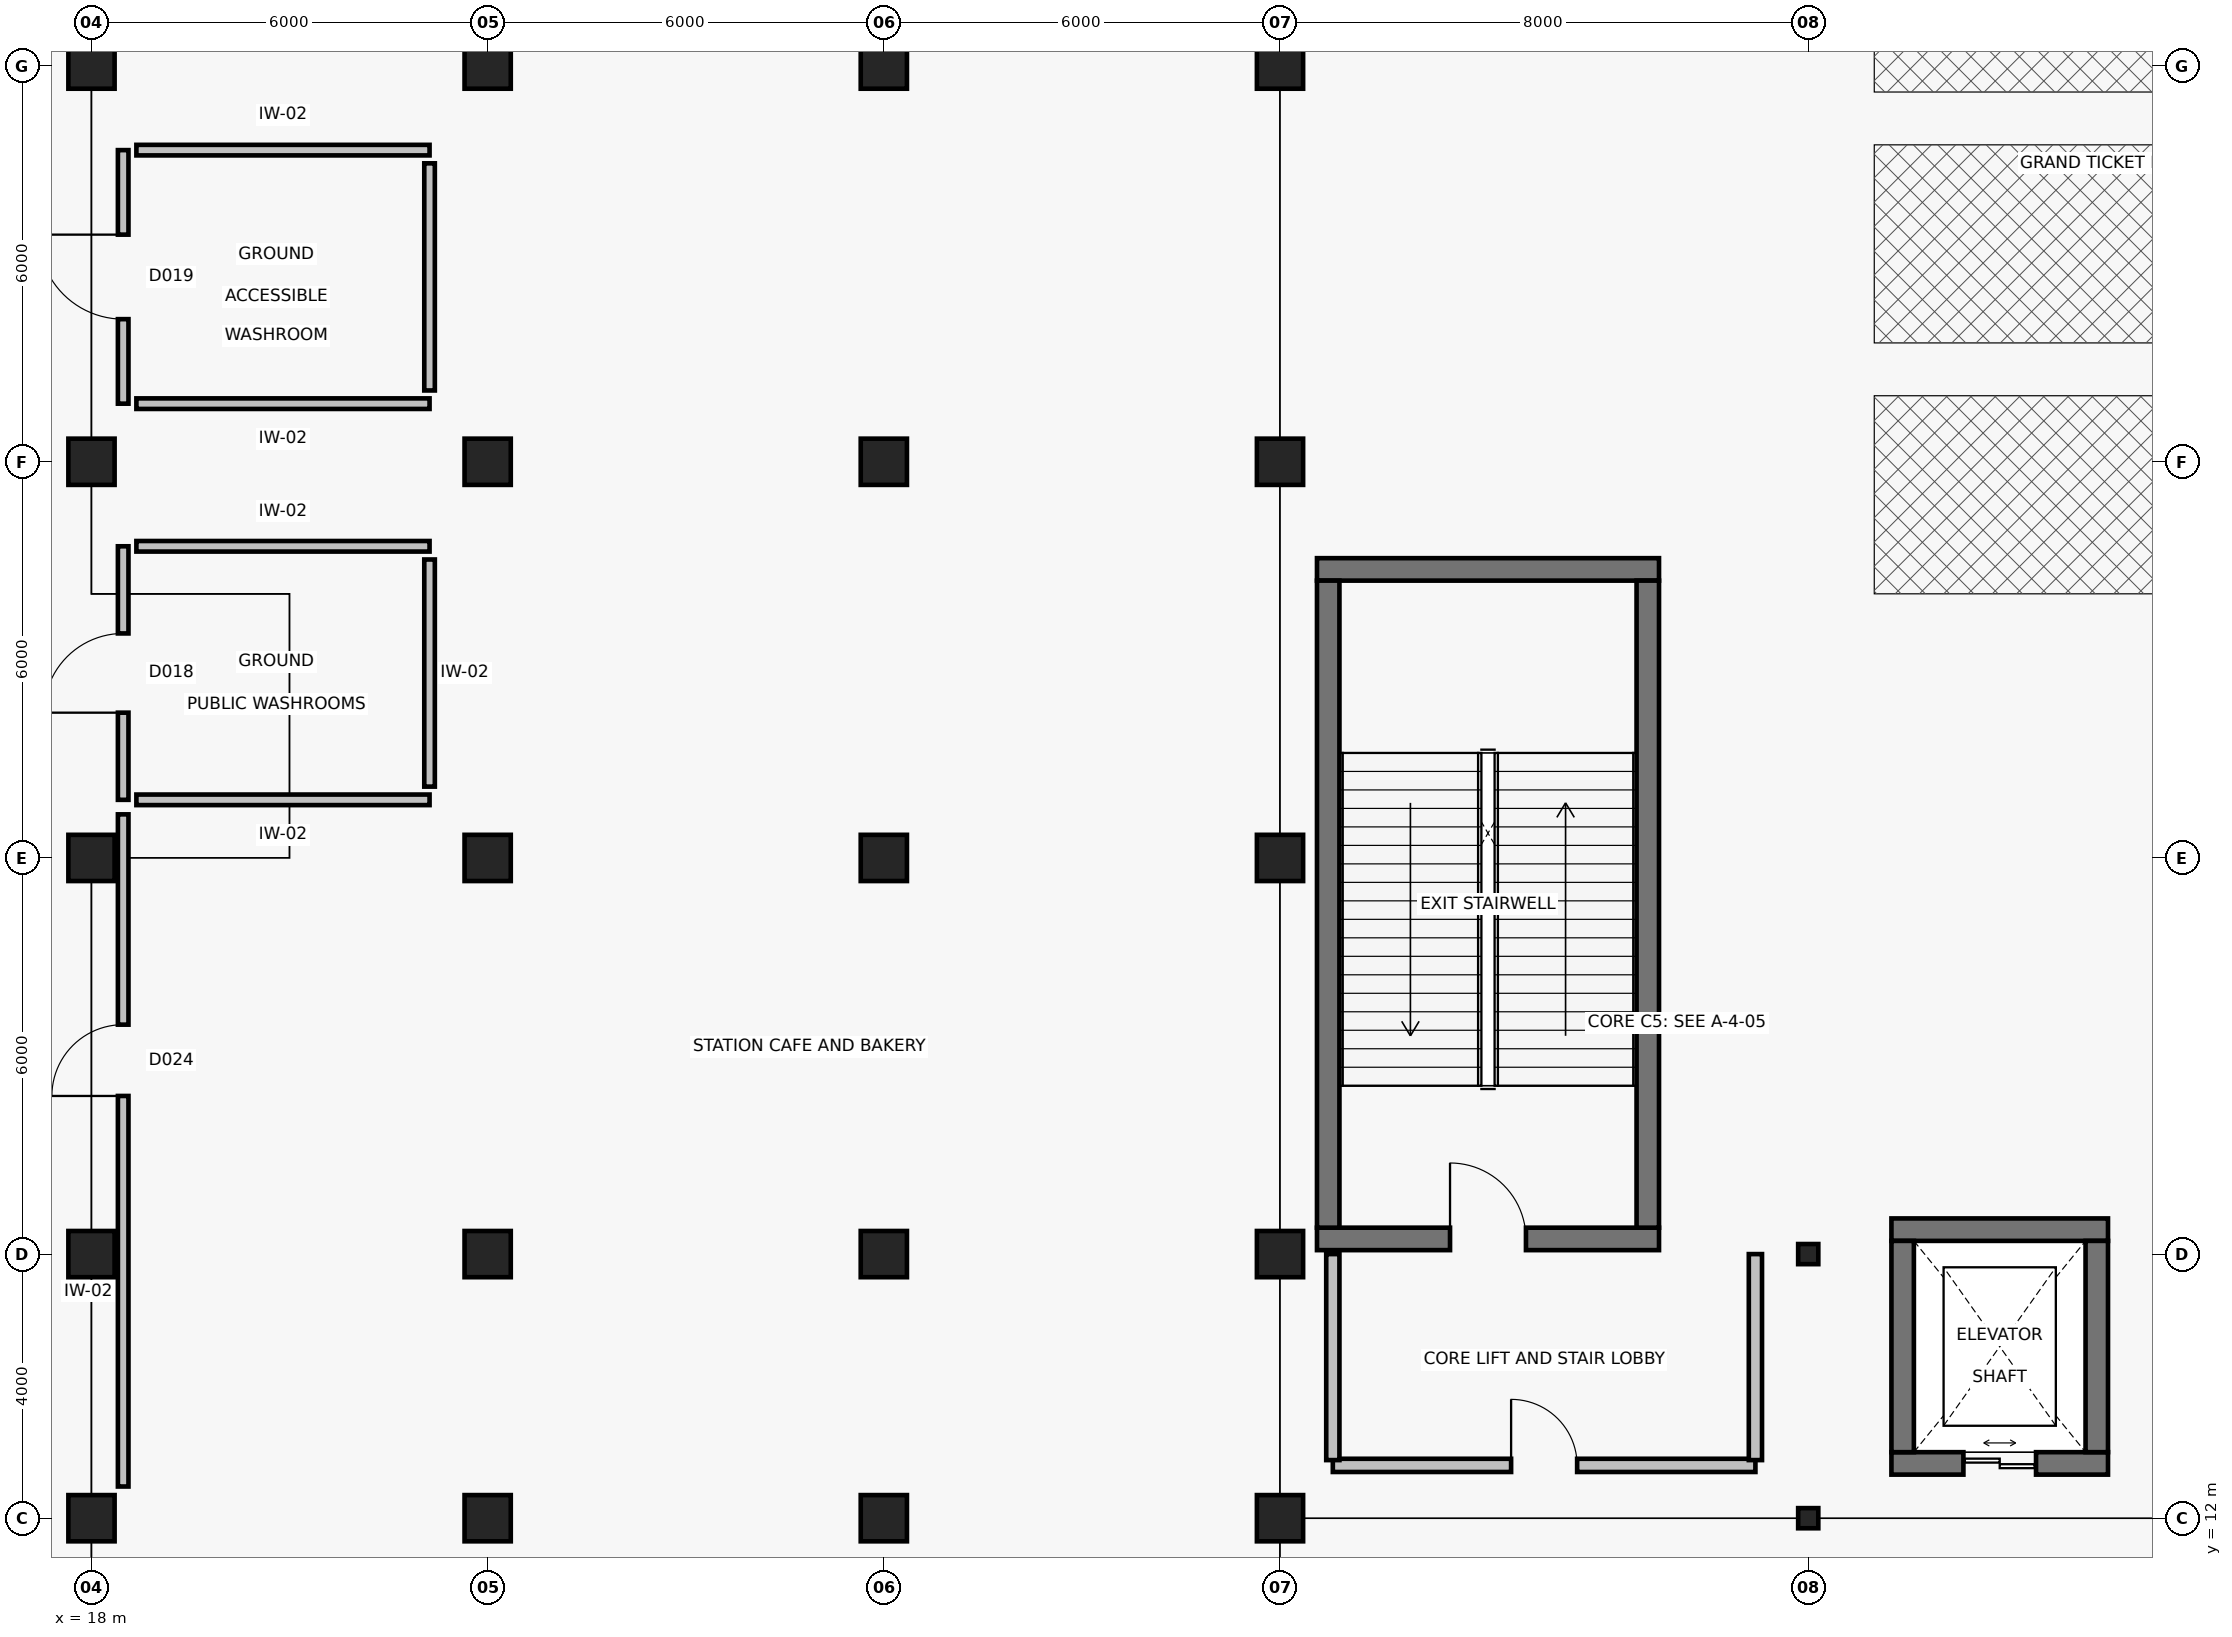
"""IFC4 building model, lengths in metres.
Left out: names, types, materials, properties, quantities, classifications, styles, units other than length and angle.
Written with IfcOpenShell. Run it as: python <this file> out.ifc"""

import sys

from ifc_helpers import new_model, si_unit, direction, frame, frame_2d, origin, origin_2d, place, context, subcontext, project, spatial, rectangle, hollow_rectangle, extrude, element, fill, save


model = new_model("IFC4")
c1 = context("Model", 3, precision=1e-05, world=origin(), true_north=direction((0.0, 1.0)))
c2 = subcontext(c1, "Body", "Model", "MODEL_VIEW")
j1 = project(units=[si_unit("LENGTHUNIT", "METRE"), si_unit("PLANEANGLEUNIT", "RADIAN")], contexts=[c1])
p1 = place(None, origin())
s1 = spatial("IfcSite", under=j1, at=p1, CompositionType="ELEMENT")
p2 = place(p1, origin())
s2 = spatial("IfcBuilding", under=s1, at=p2, CompositionType="ELEMENT")
p3 = place(p2, origin())
s3 = spatial("IfcBuildingStorey", under=s2, at=p3, CompositionType="ELEMENT", Elevation=0.0)
for number, where, z_axis, x_axis in (
    (1, (18.0, 12.0, 0.0), (0.0, 0.0, 1.0), (1.0, 0.0, 0.0)),
    (2, (18.0, 16.0, 0.0), (0.0, 0.0, 1.0), (1.0, 0.0, 0.0)),
    (3, (18.0, 22.0, 0.0), (0.0, 0.0, 1.0), (1.0, 0.0, 0.0)),
    (4, (18.0, 28.0, 0.0), (0.0, 0.0, 1.0), (1.0, 0.0, 0.0)),
    (5, (18.0, 34.0, 0.0), (0.0, 0.0, 1.0), (1.0, 0.0, 0.0)),
    (6, (24.0, 12.0, 0.0), (0.0, 0.0, 1.0), (1.0, 0.0, 0.0)),
    (7, (24.0, 16.0, 0.0), (0.0, 0.0, 1.0), (1.0, 0.0, 0.0)),
    (8, (24.0, 22.0, 0.0), (0.0, 0.0, 1.0), (1.0, 0.0, 0.0)),
    (9, (24.0, 28.0, 0.0), (0.0, 0.0, 1.0), (1.0, 0.0, 0.0)),
    (10, (24.0, 34.0, 0.0), (0.0, 0.0, 1.0), (1.0, 0.0, 0.0)),
    (11, (30.0, 12.0, 0.0), (0.0, 0.0, 1.0), (1.0, 0.0, 0.0)),
    (12, (30.0, 16.0, 0.0), (0.0, 0.0, 1.0), (1.0, 0.0, 0.0)),
    (13, (30.0, 22.0, 0.0), (0.0, 0.0, 1.0), (1.0, 0.0, 0.0)),
    (14, (30.0, 28.0, 0.0), (0.0, 0.0, 1.0), (1.0, 0.0, 0.0)),
    (15, (30.0, 34.0, 0.0), (0.0, 0.0, 1.0), (1.0, 0.0, 0.0)),
    (16, (36.0, 12.0, 0.0), (0.0, 0.0, 1.0), (1.0, 0.0, 0.0)),
    (17, (36.0, 16.0, 0.0), (0.0, 0.0, 1.0), (1.0, 0.0, 0.0)),
    (18, (36.0, 22.0, 0.0), (0.0, 0.0, 1.0), (1.0, 0.0, 0.0)),
    (19, (36.0, 28.0, 0.0), (0.0, 0.0, 1.0), (1.0, 0.0, 0.0)),
    (20, (36.0, 34.0, 0.0), (0.0, 0.0, 1.0), (1.0, 0.0, 0.0)),
):
    element("IfcColumn", number, at=place(p3, frame(where, z_axis=z_axis, x_axis=x_axis)), inside=s3, PredefinedType="COLUMN", context=c2, shape_type="SweptSolid", body=[
        extrude(rectangle(XDim=0.7, YDim=0.7, at=origin_2d()), origin(), (0.0, 0.0, 1.0), 6.6),
    ])
for number, where, z_axis, x_axis in (
    (21, (44.0, 12.0, 0.0), (0.0, 0.0, 1.0), (1.0, 0.0, 0.0)),
    (22, (44.0, 16.0, 0.0), (0.0, 0.0, 1.0), (1.0, 0.0, 0.0)),
):
    element("IfcColumn", number, at=place(p3, frame(where, z_axis=z_axis, x_axis=x_axis)), inside=s3, PredefinedType="COLUMN", context=c2, shape_type="SweptSolid", body=[
        extrude(hollow_rectangle(XDim=0.305, YDim=0.305, WallThickness=0.013, InnerFilletRadius=0.013, OuterFilletRadius=0.025, at=origin_2d()), origin(), (0.0, 0.0, 1.0), 6.6),
    ])
p4 = place(p3, frame((36.56, 16.23, 0.0), z_axis=(0.0, 0.0, 1.0), x_axis=(1.0, 0.0, 0.0)))
e23 = element("IfcWall", 23, at=p4, inside=s3, PredefinedType="SHEAR", context=c2, shape_type="SweptSolid", body=[
    extrude(rectangle(XDim=5.18, YDim=0.34, at=frame_2d((2.59, 0.0))), origin(), (0.0, 0.0, 1.0), 6.32),
])
p5 = place(p4, frame((2.015, 0.0, 0.0)))
e24 = element("IfcOpeningElement", 24, at=p5, cuts=e23, PredefinedType="OPENING", context=c2, shape_type="SweptSolid", body=[
    extrude(rectangle(XDim=1.15, YDim=2.15, at=frame_2d((0.575, 1.075))), frame((0.0, 0.185, 0.0), z_axis=(0.0, -1.0, 0.0), x_axis=(1.0, 0.0, 0.0)), (0.0, 0.0, 1.0), 0.37),
])
p6 = place(p3, frame((41.74, 26.37, 0.0), z_axis=(0.0, 0.0, 1.0), x_axis=(-1.0, 0.0, 0.0)))
e25 = element("IfcWall", 25, at=p6, inside=s3, PredefinedType="SHEAR", context=c2, shape_type="SweptSolid", body=[
    extrude(rectangle(XDim=5.18, YDim=0.34, at=frame_2d((2.59, 0.0))), origin(), (0.0, 0.0, 1.0), 6.32),
])
for number, where, z_axis, x_axis in (
    (26, (36.73, 26.2, 0.0), (0.0, 0.0, 1.0), (0.0, -1.0, 0.0)),
    (27, (41.57, 16.4, 0.0), (0.0, 0.0, 1.0), (0.0, 1.0, 0.0)),
):
    element("IfcWall", number, at=place(p3, frame(where, z_axis=z_axis, x_axis=x_axis)), inside=s3, PredefinedType="SHEAR", context=c2, shape_type="SweptSolid", body=[
        extrude(rectangle(XDim=9.8, YDim=0.34, at=frame_2d((4.9, 0.0))), origin(), (0.0, 0.0, 1.0), 6.32),
    ])
p7 = place(p3, frame((45.26, 12.83, 0.0), z_axis=(0.0, 0.0, 1.0), x_axis=(1.0, 0.0, 0.0)))
e28 = element("IfcWall", 28, at=p7, inside=s3, PredefinedType="SHEAR", context=c2, shape_type="SweptSolid", body=[
    extrude(rectangle(XDim=3.28, YDim=0.34, at=frame_2d((1.64, 0.0))), origin(), (0.0, 0.0, 1.0), 6.32),
])
p8 = place(p7, frame((1.09, 0.0, 0.0)))
e29 = element("IfcOpeningElement", 29, at=p8, cuts=e28, PredefinedType="OPENING", context=c2, shape_type="SweptSolid", body=[
    extrude(rectangle(XDim=1.1, YDim=2.2, at=frame_2d((0.55, 1.1))), frame((0.0, 0.185, 0.0), z_axis=(0.0, -1.0, 0.0), x_axis=(1.0, 0.0, 0.0)), (0.0, 0.0, 1.0), 0.37),
])
p9 = place(p3, frame((48.54, 16.37, 0.0), z_axis=(0.0, 0.0, 1.0), x_axis=(-1.0, 0.0, 0.0)))
e30 = element("IfcWall", 30, at=p9, inside=s3, PredefinedType="SHEAR", context=c2, shape_type="SweptSolid", body=[
    extrude(rectangle(XDim=3.28, YDim=0.34, at=frame_2d((1.64, 0.0))), origin(), (0.0, 0.0, 1.0), 6.32),
])
for number, where, z_axis, x_axis in (
    (31, (45.43, 16.2, 0.0), (0.0, 0.0, 1.0), (0.0, -1.0, 0.0)),
    (32, (48.37, 13.0, 0.0), (0.0, 0.0, 1.0), (0.0, 1.0, 0.0)),
):
    element("IfcWall", number, at=place(p3, frame(where, z_axis=z_axis, x_axis=x_axis)), inside=s3, PredefinedType="SHEAR", context=c2, shape_type="SweptSolid", body=[
        extrude(rectangle(XDim=3.2, YDim=0.34, at=frame_2d((1.6, 0.0))), origin(), (0.0, 0.0, 1.0), 6.32),
    ])
p10 = place(p3, frame((36.8, 12.8, 0.0), z_axis=(0.0, 0.0, 1.0), x_axis=(1.0, 0.0, 0.0)))
e33 = element("IfcWall", 33, at=p10, inside=s3, PredefinedType="PARTITIONING", context=c2, shape_type="SweptSolid", body=[
    extrude(rectangle(XDim=6.4, YDim=0.2, at=frame_2d((3.2, 0.0))), origin(), (0.0, 0.0, 1.0), 6.097),
])
p11 = place(p10, frame((2.7, 0.0, 0.0)))
e34 = element("IfcOpeningElement", 34, at=p11, cuts=e33, PredefinedType="OPENING", context=c2, shape_type="SweptSolid", body=[
    extrude(rectangle(XDim=1.0, YDim=2.15, at=frame_2d((0.5, 1.075))), frame((0.0, 0.115, 0.0), z_axis=(0.0, -1.0, 0.0), x_axis=(1.0, 0.0, 0.0)), (0.0, 0.0, 1.0), 0.23),
])
for number, where, z_axis, x_axis in (
    (35, (36.8, 16.0, 0.0), (0.0, 0.0, 1.0), (0.0, -1.0, 0.0)),
    (36, (43.2, 12.88, 0.0), (0.0, 0.0, 1.0), (0.0, 1.0, 0.0)),
):
    element("IfcWall", number, at=place(p3, frame(where, z_axis=z_axis, x_axis=x_axis)), inside=s3, PredefinedType="PARTITIONING", context=c2, shape_type="SweptSolid", body=[
        extrude(rectangle(XDim=3.12, YDim=0.2, at=frame_2d((1.56, 0.0))), origin(), (0.0, 0.0, 1.0), 5.689),
    ])
p12 = place(p3, frame((18.48, 22.88, 0.0), z_axis=(0.0, 0.0, 1.0), x_axis=(0.0, 1.0, 0.0)))
e37 = element("IfcWall", 37, at=p12, inside=s3, PredefinedType="PARTITIONING", context=c2, shape_type="SweptSolid", body=[
    extrude(rectangle(XDim=3.84, YDim=0.16, at=frame_2d((1.92, 0.0))), origin(), (0.0, 0.0, 1.0), 6.32),
])
p13 = place(p12, frame((1.32, 0.0, 0.0)))
e38 = element("IfcOpeningElement", 38, at=p13, cuts=e37, PredefinedType="OPENING", context=c2, shape_type="SweptSolid", body=[
    extrude(rectangle(XDim=1.2, YDim=2.15, at=frame_2d((0.6, 1.075))), frame((0.0, 0.095, 0.0), z_axis=(0.0, -1.0, 0.0), x_axis=(1.0, 0.0, 0.0)), (0.0, 0.0, 1.0), 0.19),
])
for number, where, z_axis, x_axis in (
    (39, (18.68, 26.72, 0.0), (0.0, 0.0, 1.0), (1.0, 0.0, 0.0)),
    (40, (23.12, 22.88, 0.0), (0.0, 0.0, 1.0), (-1.0, 0.0, 0.0)),
):
    element("IfcWall", number, at=place(p3, frame(where, z_axis=z_axis, x_axis=x_axis)), inside=s3, PredefinedType="PARTITIONING", context=c2, shape_type="SweptSolid", body=[
        extrude(rectangle(XDim=4.44, YDim=0.16, at=frame_2d((2.22, 0.0))), origin(), (0.0, 0.0, 1.0), 6.047),
    ])
p14 = place(p3, frame((23.12, 26.52, 0.0), z_axis=(0.0, 0.0, 1.0), x_axis=(0.0, -1.0, 0.0)))
e41 = element("IfcWall", 41, at=p14, inside=s3, PredefinedType="PARTITIONING", context=c2, shape_type="SweptSolid", body=[
    extrude(rectangle(XDim=3.44, YDim=0.16, at=frame_2d((1.72, 0.0))), origin(), (0.0, 0.0, 1.0), 6.32),
])
p15 = place(p3, frame((18.48, 28.88, 0.0), z_axis=(0.0, 0.0, 1.0), x_axis=(0.0, 1.0, 0.0)))
e42 = element("IfcWall", 42, at=p15, inside=s3, PredefinedType="PARTITIONING", context=c2, shape_type="SweptSolid", body=[
    extrude(rectangle(XDim=3.84, YDim=0.16, at=frame_2d((1.92, 0.0))), origin(), (0.0, 0.0, 1.0), 6.32),
])
p16 = place(p15, frame((1.28, 0.0, 0.0)))
e43 = element("IfcOpeningElement", 43, at=p16, cuts=e42, PredefinedType="OPENING", context=c2, shape_type="SweptSolid", body=[
    extrude(rectangle(XDim=1.28, YDim=2.2, at=frame_2d((0.64, 1.1))), frame((0.0, 0.095, 0.0), z_axis=(0.0, -1.0, 0.0), x_axis=(1.0, 0.0, 0.0)), (0.0, 0.0, 1.0), 0.19),
])
for number, where, z_axis, x_axis in (
    (44, (18.68, 32.72, 0.0), (0.0, 0.0, 1.0), (1.0, 0.0, 0.0)),
    (45, (23.12, 28.88, 0.0), (0.0, 0.0, 1.0), (-1.0, 0.0, 0.0)),
):
    element("IfcWall", number, at=place(p3, frame(where, z_axis=z_axis, x_axis=x_axis)), inside=s3, PredefinedType="PARTITIONING", context=c2, shape_type="SweptSolid", body=[
        extrude(rectangle(XDim=4.44, YDim=0.16, at=frame_2d((2.22, 0.0))), origin(), (0.0, 0.0, 1.0), 5.99),
    ])
p17 = place(p3, frame((23.12, 32.52, 0.0), z_axis=(0.0, 0.0, 1.0), x_axis=(0.0, -1.0, 0.0)))
e46 = element("IfcWall", 46, at=p17, inside=s3, PredefinedType="PARTITIONING", context=c2, shape_type="SweptSolid", body=[
    extrude(rectangle(XDim=3.44, YDim=0.16, at=frame_2d((1.72, 0.0))), origin(), (0.0, 0.0, 1.0), 6.32),
])
p18 = place(p3, frame((18.48, 12.48, 0.0), z_axis=(0.0, 0.0, 1.0), x_axis=(0.0, 1.0, 0.0)))
e47 = element("IfcWall", 47, at=p18, inside=s3, PredefinedType="PARTITIONING", context=c2, shape_type="SweptSolid", body=[
    extrude(rectangle(XDim=10.18, YDim=0.16, at=frame_2d((5.09, 0.0))), origin(), (0.0, 0.0, 1.0), 5.89),
])
p19 = place(p18, frame((5.915, 0.0, 0.0)))
e48 = element("IfcOpeningElement", 48, at=p19, cuts=e47, PredefinedType="OPENING", context=c2, shape_type="SweptSolid", body=[
    extrude(rectangle(XDim=1.08, YDim=2.15, at=frame_2d((0.54, 1.075))), frame((0.0, 0.095, 0.0), z_axis=(0.0, -1.0, 0.0), x_axis=(1.0, 0.0, 0.0)), (0.0, 0.0, 1.0), 0.19),
])
p20 = place(p5, origin())
e49 = element("IfcDoor", 49, at=p20, inside=s3, OperationType="SINGLE_SWING_LEFT", PredefinedType="DOOR", context=c2, shape_type="SweptSolid", body=[
    extrude(rectangle(XDim=1.15, YDim=2.15, at=frame_2d((0.575, 1.075))), frame((0.0, 0.025, 0.0), z_axis=(0.0, -1.0, 0.0), x_axis=(1.0, 0.0, 0.0)), (0.0, 0.0, 1.0), 0.05),
])
fill(e24, e49)
p21 = place(p8, origin())
e50 = element("IfcDoor", 50, at=p21, inside=s3, OperationType="DOUBLE_DOOR_SLIDING", PredefinedType="DOOR", context=c2, shape_type="SweptSolid", body=[
    extrude(rectangle(XDim=1.1, YDim=2.2, at=frame_2d((0.55, 1.1))), frame((0.0, 0.025, 0.0), z_axis=(0.0, -1.0, 0.0), x_axis=(1.0, 0.0, 0.0)), (0.0, 0.0, 1.0), 0.05),
])
fill(e29, e50)
p22 = place(p11, origin())
e51 = element("IfcDoor", 51, at=p22, inside=s3, OperationType="SINGLE_SWING_LEFT", PredefinedType="DOOR", context=c2, shape_type="SweptSolid", body=[
    extrude(rectangle(XDim=1.0, YDim=2.15, at=frame_2d((0.5, 1.075))), frame((0.0, 0.025, 0.0), z_axis=(0.0, -1.0, 0.0), x_axis=(1.0, 0.0, 0.0)), (0.0, 0.0, 1.0), 0.05),
])
fill(e34, e51)
p23 = place(p13, origin())
e52 = element("IfcDoor", 52, at=p23, inside=s3, OperationType="SINGLE_SWING_LEFT", PredefinedType="DOOR", context=c2, shape_type="SweptSolid", body=[
    extrude(rectangle(XDim=1.2, YDim=2.15, at=frame_2d((0.6, 1.075))), frame((0.0, 0.025, 0.0), z_axis=(0.0, -1.0, 0.0), x_axis=(1.0, 0.0, 0.0)), (0.0, 0.0, 1.0), 0.05),
])
fill(e38, e52)
p24 = place(p16, origin())
e53 = element("IfcDoor", 53, at=p24, inside=s3, OperationType="SINGLE_SWING_RIGHT", PredefinedType="DOOR", context=c2, shape_type="SweptSolid", body=[
    extrude(rectangle(XDim=1.28, YDim=2.2, at=frame_2d((0.64, 1.1))), frame((0.0, 0.025, 0.0), z_axis=(0.0, -1.0, 0.0), x_axis=(1.0, 0.0, 0.0)), (0.0, 0.0, 1.0), 0.05),
])
fill(e43, e53)
p25 = place(p19, origin())
e54 = element("IfcDoor", 54, at=p25, inside=s3, OperationType="SINGLE_SWING_LEFT", PredefinedType="DOOR", context=c2, shape_type="SweptSolid", body=[
    extrude(rectangle(XDim=1.08, YDim=2.15, at=frame_2d((0.54, 1.075))), frame((0.0, 0.025, 0.0), z_axis=(0.0, -1.0, 0.0), x_axis=(1.0, 0.0, 0.0)), (0.0, 0.0, 1.0), 0.05),
])
fill(e48, e54)
save(model, sys.argv[1])
